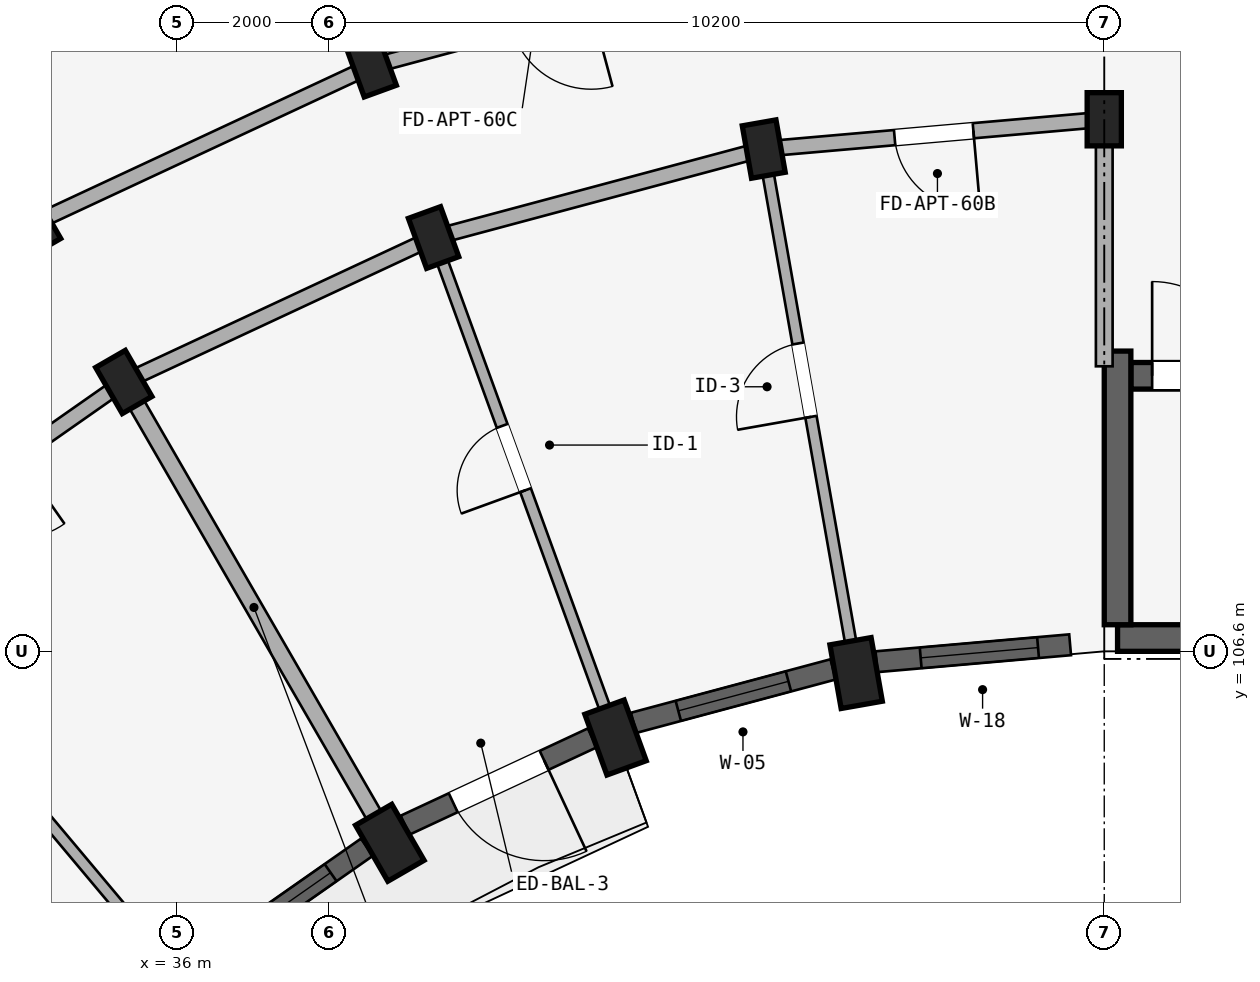
"""IFC4 building model, lengths in metres.
Left out: names, types, materials, properties, quantities, classifications, styles, units other than length and angle.
Written with IfcOpenShell. Run it as: python <this file> out.ifc"""

import sys

from ifc_helpers import new_model, si_unit, direction, frame, frame_2d, origin, origin_2d, place, context, subcontext, project, spatial, rectangle, extrude, element, fill, save


model = new_model("IFC4")
c1 = context("Model", 3, precision=1e-05, world=origin(), true_north=direction((0.0, 1.0)))
c2 = subcontext(c1, "Body", "Model", "MODEL_VIEW")
j1 = project(units=[si_unit("LENGTHUNIT", "METRE"), si_unit("PLANEANGLEUNIT", "RADIAN")], contexts=[c1])
p1 = place(None, origin())
s1 = spatial("IfcSite", under=j1, at=p1, CompositionType="ELEMENT")
p2 = place(p1, origin())
s2 = spatial("IfcBuilding", under=s1, at=p2, CompositionType="ELEMENT")
p3 = place(p2, frame((0.0, 0.0, 11.85)))
s3 = spatial("IfcBuildingStorey", under=s2, at=p3, CompositionType="ELEMENT", Elevation=11.85)
p4 = place(p3, frame((48.375, 106.775, 0.0), z_axis=(0.0, 0.0, 1.0), x_axis=(1.0, 0.0, 0.0)))
e1 = element("IfcWall", 1, at=p4, inside=s3, PredefinedType="SHEAR", context=c2, shape_type="SweptSolid", body=[
    extrude(rectangle(XDim=8.25, YDim=0.35, at=frame_2d((4.125, 0.0))), origin(), (0.0, 0.0, 1.0), 2.93),
])
p5 = place(p3, frame((48.55, 110.225, 0.0), z_axis=(0.0, 0.0, 1.0), x_axis=(1.0, 0.0, 0.0)))
e2 = element("IfcWall", 2, at=p5, inside=s3, PredefinedType="SHEAR", context=c2, shape_type="SweptSolid", body=[
    extrude(rectangle(XDim=7.9, YDim=0.35, at=frame_2d((3.95, 0.0))), origin(), (0.0, 0.0, 1.0), 2.93),
])
p6 = place(p5, frame((0.28, 0.0, 0.0)))
e3 = element("IfcOpeningElement", 3, at=p6, cuts=e2, PredefinedType="OPENING", context=c2, shape_type="SweptSolid", body=[
    extrude(rectangle(XDim=1.24, YDim=2.15, at=frame_2d((0.62, 1.075))), frame((0.0, 0.185, 0.0), z_axis=(0.0, -1.0, 0.0), x_axis=(1.0, 0.0, 0.0)), (0.0, 0.0, 1.0), 0.37),
])
p7 = place(p3, frame((48.375, 106.95, 0.0), z_axis=(0.0, 0.0, 1.0), x_axis=(0.0, 1.0, 0.0)))
e4 = element("IfcWall", 4, at=p7, inside=s3, PredefinedType="SHEAR", context=c2, shape_type="SweptSolid", body=[
    extrude(rectangle(XDim=3.6, YDim=0.35, at=frame_2d((1.8, 0.0))), origin(), (0.0, 0.0, 1.0), 2.93),
])
p8 = place(p3, frame((48.2, 113.6, 0.0), z_axis=(0.0, 0.0, 1.0), x_axis=(1.0, 0.0, 0.0)))
e5 = element("IfcColumn", 5, at=p8, inside=s3, PredefinedType="COLUMN", context=c2, shape_type="SweptSolid", body=[
    extrude(rectangle(XDim=0.45, YDim=0.7, at=origin_2d()), origin(), (0.0, 0.0, 1.0), 2.93),
])
p9 = place(p3, frame((44.935, 106.314, 0.0), z_axis=(0.0, 0.0, 1.0), x_axis=(0.984807753012, 0.173648177667, 0.0)))
e6 = element("IfcColumn", 6, at=p9, inside=s3, PredefinedType="COLUMN", context=c2, shape_type="SweptSolid", body=[
    extrude(rectangle(XDim=0.55, YDim=0.85, at=origin_2d()), origin(), (0.0, 0.0, 1.0), 2.93),
])
p10 = place(p3, frame((43.72, 113.208, 0.0), z_axis=(0.0, 0.0, 1.0), x_axis=(0.984807753012, 0.173648177667, 0.0)))
e7 = element("IfcColumn", 7, at=p10, inside=s3, PredefinedType="COLUMN", context=c2, shape_type="SweptSolid", body=[
    extrude(rectangle(XDim=0.45, YDim=0.7, at=origin_2d()), origin(), (0.0, 0.0, 1.0), 2.93),
])
p11 = place(p3, frame((41.77, 105.466, 0.0), z_axis=(0.0, 0.0, 1.0), x_axis=(0.939692620786, 0.342020143326, 0.0)))
e8 = element("IfcColumn", 8, at=p11, inside=s3, PredefinedType="COLUMN", context=c2, shape_type="SweptSolid", body=[
    extrude(rectangle(XDim=0.55, YDim=0.85, at=origin_2d()), origin(), (0.0, 0.0, 1.0), 2.93),
])
for number, where, z_axis, x_axis in (
    (9, (39.376, 112.044, 0.0), (0.0, 0.0, 1.0), (0.94, 0.342, 0.0)),
    (10, (38.555, 114.299, 0.0), (0.0, 0.0, 1.0), (0.94, 0.342, 0.0)),
):
    element("IfcColumn", number, at=place(p3, frame(where, z_axis=z_axis, x_axis=x_axis)), inside=s3, PredefinedType="COLUMN", context=c2, shape_type="SweptSolid", body=[
        extrude(rectangle(XDim=0.45, YDim=0.7, at=origin_2d()), origin(), (0.0, 0.0, 1.0), 2.93),
    ])
p12 = place(p3, frame((38.8, 104.081, 0.0), z_axis=(0.0, 0.0, 1.0), x_axis=(0.866025403784, 0.5, 0.0)))
e11 = element("IfcColumn", 11, at=p12, inside=s3, PredefinedType="COLUMN", context=c2, shape_type="SweptSolid", body=[
    extrude(rectangle(XDim=0.55, YDim=0.85, at=origin_2d()), origin(), (0.0, 0.0, 1.0), 2.93),
])
for number, where, z_axis, x_axis in (
    (12, (35.3, 110.144, 0.0), (0.0, 0.0, 1.0), (0.866, 0.5, 0.0)),
    (13, (34.1, 112.222, 0.0), (0.0, 0.0, 1.0), (0.866, 0.5, 0.0)),
):
    element("IfcColumn", number, at=place(p3, frame(where, z_axis=z_axis, x_axis=x_axis)), inside=s3, PredefinedType="COLUMN", context=c2, shape_type="SweptSolid", body=[
        extrude(rectangle(XDim=0.45, YDim=0.7, at=origin_2d()), origin(), (0.0, 0.0, 1.0), 2.93),
    ])
p13 = place(p3, frame((48.2, 113.6, 0.0), z_axis=(0.0, 0.0, 1.0), x_axis=(-0.996191949488, -0.087187153726, 0.0)))
e14 = element("IfcWall", 14, at=p13, inside=s3, PredefinedType="STANDARD", context=c2, shape_type="SweptSolid", body=[
    extrude(rectangle(XDim=4.497, YDim=0.2, at=frame_2d((2.249, 0.0))), origin(), (0.0, 0.0, 1.0), 2.372),
])
p14 = place(p13, frame((1.729, 0.0, 0.0)))
e15 = element("IfcOpeningElement", 15, at=p14, cuts=e14, PredefinedType="OPENING", context=c2, shape_type="SweptSolid", body=[
    extrude(rectangle(XDim=1.04, YDim=2.15, at=frame_2d((0.52, 1.075))), frame((0.0, 0.11, 0.0), z_axis=(0.0, -1.0, 0.0), x_axis=(1.0, 0.0, 0.0)), (0.0, 0.0, 1.0), 0.22),
])
p15 = place(p3, frame((43.72, 113.208, 0.0), z_axis=(0.0, 0.0, 1.0), x_axis=(-0.965934240054, -0.258787642463, 0.0)))
e16 = element("IfcWall", 16, at=p15, inside=s3, PredefinedType="STANDARD", context=c2, shape_type="SweptSolid", body=[
    extrude(rectangle(XDim=4.497, YDim=0.2, at=frame_2d((2.249, 0.0))), origin(), (0.0, 0.0, 1.0), 2.372),
])
p16 = place(p3, frame((43.303, 115.572, 0.0), z_axis=(0.0, 0.0, 1.0), x_axis=(-0.965930095386, -0.258803112091, 0.0)))
e17 = element("IfcWall", 17, at=p16, inside=s3, PredefinedType="STANDARD", context=c2, shape_type="SweptSolid", body=[
    extrude(rectangle(XDim=4.916, YDim=0.2, at=frame_2d((2.458, 0.0))), origin(), (0.0, 0.0, 1.0), 2.372),
])
p17 = place(p16, frame((1.918, 0.0, 0.0)))
e18 = element("IfcOpeningElement", 18, at=p17, cuts=e17, PredefinedType="OPENING", context=c2, shape_type="SweptSolid", body=[
    extrude(rectangle(XDim=1.08, YDim=2.15, at=frame_2d((0.54, 1.075))), frame((0.0, 0.11, 0.0), z_axis=(0.0, -1.0, 0.0), x_axis=(1.0, 0.0, 0.0)), (0.0, 0.0, 1.0), 0.22),
])
p18 = place(p3, frame((39.376, 112.044, 0.0), z_axis=(0.0, 0.0, 1.0), x_axis=(-0.906307919131, -0.422617978463, 0.0)))
e19 = element("IfcWall", 19, at=p18, inside=s3, PredefinedType="STANDARD", context=c2, shape_type="SweptSolid", body=[
    extrude(rectangle(XDim=4.497, YDim=0.2, at=frame_2d((2.249, 0.0))), origin(), (0.0, 0.0, 1.0), 2.372),
])
p19 = place(p3, frame((38.555, 114.299, 0.0), z_axis=(0.0, 0.0, 1.0), x_axis=(-0.906302381024, -0.422629854778, 0.0)))
e20 = element("IfcWall", 20, at=p19, inside=s3, PredefinedType="STANDARD", context=c2, shape_type="SweptSolid", body=[
    extrude(rectangle(XDim=4.915, YDim=0.2, at=frame_2d((2.458, 0.0))), origin(), (0.0, 0.0, 1.0), 2.372),
])
p20 = place(p3, frame((35.3, 110.144, 0.0), z_axis=(0.0, 0.0, 1.0), x_axis=(-0.819155404658, -0.573571637217, 0.0)))
e21 = element("IfcWall", 21, at=p20, inside=s3, PredefinedType="STANDARD", context=c2, shape_type="SweptSolid", body=[
    extrude(rectangle(XDim=4.497, YDim=0.2, at=frame_2d((2.249, 0.0))), origin(), (0.0, 0.0, 1.0), 2.372),
])
p21 = place(p20, frame((1.709, 0.0, 0.0)))
e22 = element("IfcOpeningElement", 22, at=p21, cuts=e21, PredefinedType="OPENING", context=c2, shape_type="SweptSolid", body=[
    extrude(rectangle(XDim=1.08, YDim=2.15, at=frame_2d((0.54, 1.075))), frame((0.0, 0.11, 0.0), z_axis=(0.0, -1.0, 0.0), x_axis=(1.0, 0.0, 0.0)), (0.0, 0.0, 1.0), 0.22),
])
p22 = place(p3, frame((48.2, 110.35, 0.0), z_axis=(0.0, 0.0, 1.0), x_axis=(0.0, 1.0, 0.0)))
e23 = element("IfcWall", 23, at=p22, inside=s3, PredefinedType="STANDARD", context=c2, shape_type="SweptSolid", body=[
    extrude(rectangle(XDim=3.2, YDim=0.22, at=frame_2d((1.6, 0.0))), origin(), (0.0, 0.0, 1.0), 2.372),
])
p23 = place(p3, frame((44.901, 106.511, 0.0), z_axis=(0.0, 0.0, 1.0), x_axis=(-0.173647089161, 0.984807944945, 0.0)))
e24 = element("IfcWall", 24, at=p23, inside=s3, PredefinedType="PARTITIONING", context=c2, shape_type="SweptSolid", body=[
    extrude(rectangle(XDim=6.75, YDim=0.15, at=frame_2d((3.375, 0.0))), origin(), (0.0, 0.0, 1.0), 2.372),
])
p24 = place(p23, frame((3.222, 0.0, 0.0)))
e25 = element("IfcOpeningElement", 25, at=p24, cuts=e24, PredefinedType="OPENING", context=c2, shape_type="SweptSolid", body=[
    extrude(rectangle(XDim=0.98, YDim=2.12, at=frame_2d((0.49, 1.06))), frame((0.0, 0.085, 0.0), z_axis=(0.0, -1.0, 0.0), x_axis=(1.0, 0.0, 0.0)), (0.0, 0.0, 1.0), 0.17),
])
p25 = place(p3, frame((41.702, 105.654, 0.0), z_axis=(0.0, 0.0, 1.0), x_axis=(-0.342010221662, 0.939696231917, 0.0)))
e26 = element("IfcWall", 26, at=p25, inside=s3, PredefinedType="PARTITIONING", context=c2, shape_type="SweptSolid", body=[
    extrude(rectangle(XDim=6.75, YDim=0.15, at=frame_2d((3.375, 0.0))), origin(), (0.0, 0.0, 1.0), 2.372),
])
p26 = place(p25, frame((3.262, 0.0, 0.0)))
e27 = element("IfcOpeningElement", 27, at=p26, cuts=e26, PredefinedType="OPENING", context=c2, shape_type="SweptSolid", body=[
    extrude(rectangle(XDim=0.9, YDim=2.1, at=frame_2d((0.45, 1.05))), frame((0.0, 0.085, 0.0), z_axis=(0.0, -1.0, 0.0), x_axis=(1.0, 0.0, 0.0)), (0.0, 0.0, 1.0), 0.17),
])
p27 = place(p3, frame((38.521, 114.393, 0.0), z_axis=(0.0, 0.0, 1.0), x_axis=(-0.342022120477, 0.939691901159, 0.0)))
e28 = element("IfcWall", 28, at=p27, inside=s3, PredefinedType="PARTITIONING", context=c2, shape_type="SweptSolid", body=[
    extrude(rectangle(XDim=17.42, YDim=0.15, at=frame_2d((8.71, 0.0))), origin(), (0.0, 0.0, 1.0), 2.372),
])
p28 = place(p27, frame((4.45, 0.0, 0.0)))
e29 = element("IfcOpeningElement", 29, at=p28, cuts=e28, PredefinedType="OPENING", context=c2, shape_type="SweptSolid", body=[
    extrude(rectangle(XDim=0.8, YDim=2.1, at=frame_2d((0.4, 1.05))), frame((0.0, 0.085, 0.0), z_axis=(0.0, -1.0, 0.0), x_axis=(1.0, 0.0, 0.0)), (0.0, 0.0, 1.0), 0.17),
])
p29 = place(p3, frame((38.7, 104.254, 0.0), z_axis=(0.0, 0.0, 1.0), x_axis=(-0.499997969693, 0.866026575979, 0.0)))
e30 = element("IfcWall", 30, at=p29, inside=s3, PredefinedType="STANDARD", context=c2, shape_type="SweptSolid", body=[
    extrude(rectangle(XDim=6.75, YDim=0.22, at=frame_2d((3.375, 0.0))), origin(), (0.0, 0.0, 1.0), 2.372),
])
p30 = place(p3, frame((35.987, 102.355, 0.0), z_axis=(0.0, 0.0, 1.0), x_axis=(-0.642784846501, 0.766046761698, 0.0)))
e31 = element("IfcWall", 31, at=p30, inside=s3, PredefinedType="PARTITIONING", context=c2, shape_type="SweptSolid", body=[
    extrude(rectangle(XDim=6.75, YDim=0.15, at=frame_2d((3.375, 0.0))), origin(), (0.0, 0.0, 1.0), 2.372),
])
p31 = place(p30, frame((3.222, 0.0, 0.0)))
e32 = element("IfcOpeningElement", 32, at=p31, cuts=e31, PredefinedType="OPENING", context=c2, shape_type="SweptSolid", body=[
    extrude(rectangle(XDim=0.98, YDim=2.12, at=frame_2d((0.49, 1.06))), frame((0.0, 0.085, 0.0), z_axis=(0.0, -1.0, 0.0), x_axis=(1.0, 0.0, 0.0)), (0.0, 0.0, 1.0), 0.17),
])
p32 = place(p3, frame((47.751, 106.686, 0.0), z_axis=(0.0, 0.0, 1.0), x_axis=(-0.996194235595, -0.08716102895, 0.0)))
e33 = element("IfcWall", 33, at=p32, inside=s3, PredefinedType="STANDARD", context=c2, shape_type="SweptSolid", body=[
    extrude(rectangle(XDim=2.557, YDim=0.275, at=frame_2d((1.279, 0.0))), origin(), (0.0, 0.0, 1.0), 2.422),
])
p33 = place(p32, frame((0.424, 0.0, 0.622)))
e34 = element("IfcOpeningElement", 34, at=p33, cuts=e33, PredefinedType="OPENING", context=c2, shape_type="SweptSolid", body=[
    extrude(rectangle(XDim=1.55, YDim=1.6, at=frame_2d((0.775, 0.8))), frame((0.0, 0.147, 0.0), z_axis=(0.0, -1.0, 0.0), x_axis=(1.0, 0.0, 0.0)), (0.0, 0.0, 1.0), 0.295),
])
p34 = place(p3, frame((44.633, 106.363, 0.0), z_axis=(0.0, 0.0, 1.0), x_axis=(-0.965925595341, -0.258819907011, 0.0)))
e35 = element("IfcWall", 35, at=p34, inside=s3, PredefinedType="STANDARD", context=c2, shape_type="SweptSolid", body=[
    extrude(rectangle(XDim=2.718, YDim=0.275, at=frame_2d((1.359, 0.0))), origin(), (0.0, 0.0, 1.0), 2.422),
])
p35 = place(p34, frame((0.609, 0.0, 0.572)))
e36 = element("IfcOpeningElement", 36, at=p35, cuts=e35, PredefinedType="OPENING", context=c2, shape_type="SweptSolid", body=[
    extrude(rectangle(XDim=1.5, YDim=1.65, at=frame_2d((0.75, 0.825))), frame((0.0, 0.147, 0.0), z_axis=(0.0, -1.0, 0.0), x_axis=(1.0, 0.0, 0.0)), (0.0, 0.0, 1.0), 0.295),
])
p36 = place(p3, frame((41.464, 105.461, 0.0), z_axis=(0.0, 0.0, 1.0), x_axis=(-0.906311629168, -0.422610022166, 0.0)))
e37 = element("IfcWall", 37, at=p36, inside=s3, PredefinedType="STANDARD", context=c2, shape_type="SweptSolid", body=[
    extrude(rectangle(XDim=2.718, YDim=0.275, at=frame_2d((1.359, 0.0))), origin(), (0.0, 0.0, 1.0), 2.422),
])
p37 = place(p36, frame((0.699, 0.0, 0.0)))
e38 = element("IfcOpeningElement", 38, at=p37, cuts=e37, PredefinedType="OPENING", context=c2, shape_type="SweptSolid", body=[
    extrude(rectangle(XDim=1.32, YDim=2.15, at=frame_2d((0.66, 1.075))), frame((0.0, 0.147, 0.0), z_axis=(0.0, -1.0, 0.0), x_axis=(1.0, 0.0, 0.0)), (0.0, 0.0, 1.0), 0.295),
])
p38 = place(p3, frame((38.499, 104.023, 0.0), z_axis=(0.0, 0.0, 1.0), x_axis=(-0.81917282593, -0.573546755948, 0.0)))
e39 = element("IfcWall", 39, at=p38, inside=s3, PredefinedType="STANDARD", context=c2, shape_type="SweptSolid", body=[
    extrude(rectangle(XDim=2.718, YDim=0.275, at=frame_2d((1.359, 0.0))), origin(), (0.0, 0.0, 1.0), 2.422),
])
p39 = place(p38, frame((0.584, 0.0, 0.622)))
e40 = element("IfcOpeningElement", 40, at=p39, cuts=e39, PredefinedType="OPENING", context=c2, shape_type="SweptSolid", body=[
    extrude(rectangle(XDim=1.55, YDim=1.6, at=frame_2d((0.775, 0.8))), frame((0.0, 0.147, 0.0), z_axis=(0.0, -1.0, 0.0), x_axis=(1.0, 0.0, 0.0)), (0.0, 0.0, 1.0), 0.295),
])
p40 = place(p33, origin())
e41 = element("IfcWindow", 41, at=p40, inside=s3, PartitioningType="DOUBLE_PANEL_VERTICAL", PredefinedType="WINDOW", context=c2, shape_type="SweptSolid", body=[
    extrude(rectangle(XDim=1.55, YDim=1.6, at=frame_2d((0.775, 0.8))), frame((0.0, 0.03, 0.0), z_axis=(0.0, -1.0, 0.0), x_axis=(1.0, 0.0, 0.0)), (0.0, 0.0, 1.0), 0.06),
])
fill(e34, e41)
p41 = place(p35, origin())
e42 = element("IfcWindow", 42, at=p41, inside=s3, PartitioningType="DOUBLE_PANEL_VERTICAL", PredefinedType="WINDOW", context=c2, shape_type="SweptSolid", body=[
    extrude(rectangle(XDim=1.5, YDim=1.65, at=frame_2d((0.75, 0.825))), frame((0.0, 0.03, 0.0), z_axis=(0.0, -1.0, 0.0), x_axis=(1.0, 0.0, 0.0)), (0.0, 0.0, 1.0), 0.06),
])
fill(e36, e42)
p42 = place(p39, origin())
e43 = element("IfcWindow", 43, at=p42, inside=s3, PartitioningType="DOUBLE_PANEL_VERTICAL", PredefinedType="WINDOW", context=c2, shape_type="SweptSolid", body=[
    extrude(rectangle(XDim=1.55, YDim=1.6, at=frame_2d((0.775, 0.8))), frame((0.0, 0.03, 0.0), z_axis=(0.0, -1.0, 0.0), x_axis=(1.0, 0.0, 0.0)), (0.0, 0.0, 1.0), 0.06),
])
fill(e40, e43)
p43 = place(p6, frame((1.24, 0.0, 0.0), z_axis=(0.0, 0.0, 1.0), x_axis=(-1.0, 0.0, 0.0)))
e44 = element("IfcDoor", 44, at=p43, inside=s3, OperationType="SINGLE_SWING_RIGHT", PredefinedType="DOOR", context=c2, shape_type="SweptSolid", body=[
    extrude(rectangle(XDim=1.24, YDim=2.15, at=frame_2d((0.62, 1.075))), frame((0.0, 0.025, 0.0), z_axis=(0.0, -1.0, 0.0), x_axis=(1.0, 0.0, 0.0)), (0.0, 0.0, 1.0), 0.05),
])
fill(e3, e44)
p44 = place(p24, frame((0.98, 0.0, 0.0), z_axis=(0.0, 0.0, 1.0), x_axis=(-1.0, 0.0, 0.0)))
e45 = element("IfcDoor", 45, at=p44, inside=s3, OperationType="SINGLE_SWING_RIGHT", PredefinedType="DOOR", context=c2, shape_type="SweptSolid", body=[
    extrude(rectangle(XDim=0.98, YDim=2.12, at=frame_2d((0.49, 1.06))), frame((0.0, 0.025, 0.0), z_axis=(0.0, -1.0, 0.0), x_axis=(1.0, 0.0, 0.0)), (0.0, 0.0, 1.0), 0.05),
])
fill(e25, e45)
p45 = place(p26, origin())
e46 = element("IfcDoor", 46, at=p45, inside=s3, OperationType="SINGLE_SWING_LEFT", PredefinedType="DOOR", context=c2, shape_type="SweptSolid", body=[
    extrude(rectangle(XDim=0.9, YDim=2.1, at=frame_2d((0.45, 1.05))), frame((0.0, 0.025, 0.0), z_axis=(0.0, -1.0, 0.0), x_axis=(1.0, 0.0, 0.0)), (0.0, 0.0, 1.0), 0.05),
])
fill(e27, e46)
p46 = place(p14, frame((1.04, 0.0, 0.0), z_axis=(0.0, 0.0, 1.0), x_axis=(-1.0, 0.0, 0.0)))
e47 = element("IfcDoor", 47, at=p46, inside=s3, OperationType="SINGLE_SWING_RIGHT", PredefinedType="DOOR", context=c2, shape_type="SweptSolid", body=[
    extrude(rectangle(XDim=1.04, YDim=2.15, at=frame_2d((0.52, 1.075))), frame((0.0, 0.025, 0.0), z_axis=(0.0, -1.0, 0.0), x_axis=(1.0, 0.0, 0.0)), (0.0, 0.0, 1.0), 0.05),
])
fill(e15, e47)
p47 = place(p37, origin())
e48 = element("IfcDoor", 48, at=p47, inside=s3, OperationType="SINGLE_SWING_LEFT", PredefinedType="DOOR", context=c2, shape_type="SweptSolid", body=[
    extrude(rectangle(XDim=1.32, YDim=2.15, at=frame_2d((0.66, 1.075))), frame((0.0, 0.025, 0.0), z_axis=(0.0, -1.0, 0.0), x_axis=(1.0, 0.0, 0.0)), (0.0, 0.0, 1.0), 0.05),
])
fill(e38, e48)
save(model, sys.argv[1])
